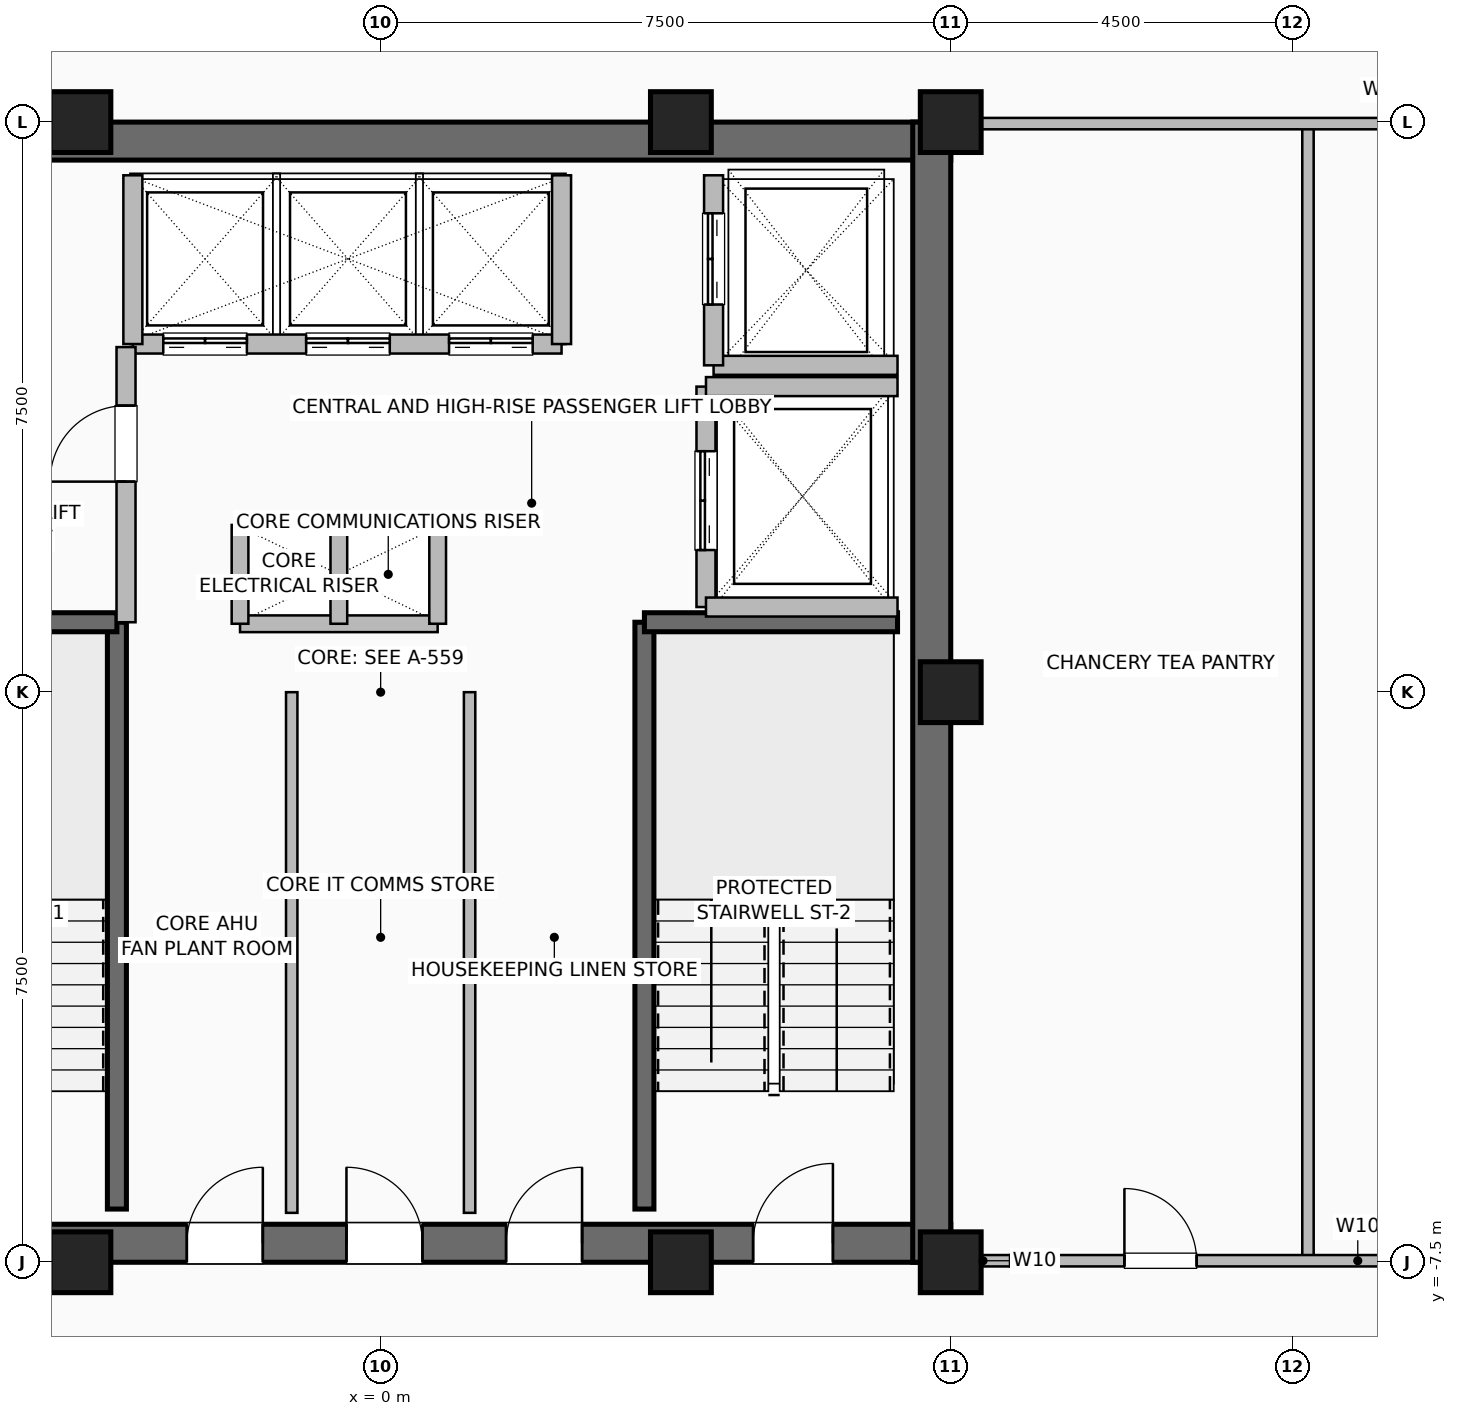
"""IFC4 building model, lengths in metres.
Left out: names, types, materials, properties, quantities, classifications, styles, units other than length and angle.
Written with IfcOpenShell. Run it as: python <this file> out.ifc"""

import sys

from ifc_helpers import new_model, si_unit, direction, frame, frame_2d, origin, origin_2d, place, context, subcontext, project, spatial, rectangle, hollow_rectangle, extrude, element, fill, save


model = new_model("IFC4")
c1 = context("Model", 3, precision=1e-05, world=origin(), true_north=direction((0.0, 1.0)))
c2 = subcontext(c1, "Body", "Model", "MODEL_VIEW")
j1 = project(units=[si_unit("LENGTHUNIT", "METRE"), si_unit("PLANEANGLEUNIT", "RADIAN")], contexts=[c1])
p1 = place(None, origin())
s1 = spatial("IfcSite", under=j1, at=p1, CompositionType="ELEMENT")
p2 = place(p1, origin())
s2 = spatial("IfcBuilding", under=s1, at=p2, CompositionType="ELEMENT")
p3 = place(p2, frame((0.0, 0.0, 236.0)))
s3 = spatial("IfcBuildingStorey", under=s2, at=p3, CompositionType="ELEMENT", Elevation=236.0)
for number, where, z_axis, x_axis in (
    (1, (-3.95, -7.5, 0.0), (0.0, 0.0, 1.0), (1.0, 0.0, 0.0)),
    (2, (3.95, -7.5, 0.0), (0.0, 0.0, 1.0), (1.0, 0.0, 0.0)),
    (3, (7.5, -7.5, 0.0), (0.0, 0.0, 1.0), (1.0, 0.0, 0.0)),
    (4, (7.5, 0.0, 0.0), (0.0, 0.0, 1.0), (1.0, 0.0, 0.0)),
    (5, (7.5, 7.5, 0.0), (0.0, 0.0, 1.0), (1.0, 0.0, 0.0)),
    (6, (3.95, 7.5, 0.0), (0.0, 0.0, 1.0), (1.0, 0.0, 0.0)),
    (7, (-3.95, 7.5, 0.0), (0.0, 0.0, 1.0), (1.0, 0.0, 0.0)),
):
    element("IfcColumn", number, at=place(p3, frame(where, z_axis=z_axis, x_axis=x_axis)), inside=s3, PredefinedType="COLUMN", context=c2, shape_type="SweptSolid", body=[
        extrude(hollow_rectangle(XDim=0.8, YDim=0.8, WallThickness=0.04, at=origin_2d()), origin(), (0.0, 0.0, 1.0), 3.6),
    ])
p4 = place(p3, frame((-7.5, -7.25, 0.0), z_axis=(0.0, 0.0, 1.0), x_axis=(1.0, 0.0, 0.0)))
e8 = element("IfcWall", 8, at=p4, inside=s3, PredefinedType="SHEAR", context=c2, shape_type="SweptSolid", body=[
    extrude(rectangle(XDim=15.0, YDim=0.5, at=frame_2d((7.5, 0.0))), origin(), (0.0, 0.0, 1.0), 3.36),
])
p5 = place(p4, frame((1.55, 0.0, 0.0)))
e9 = element("IfcOpeningElement", 9, at=p5, cuts=e8, PredefinedType="OPENING", context=c2, shape_type="SweptSolid", body=[
    extrude(rectangle(XDim=1.05, YDim=2.08, at=frame_2d((0.525, 1.04))), frame((0.0, 0.26, 0.0), z_axis=(0.0, -1.0, 0.0), x_axis=(1.0, 0.0, 0.0)), (0.0, 0.0, 1.0), 0.52),
])
p6 = place(p4, frame((12.4, 0.0, 0.0)))
e10 = element("IfcOpeningElement", 10, at=p6, cuts=e8, PredefinedType="OPENING", context=c2, shape_type="SweptSolid", body=[
    extrude(rectangle(XDim=1.05, YDim=2.08, at=frame_2d((0.525, 1.04))), frame((0.0, 0.26, 0.0), z_axis=(0.0, -1.0, 0.0), x_axis=(1.0, 0.0, 0.0)), (0.0, 0.0, 1.0), 0.52),
])
p7 = place(p4, frame((4.95, 0.0, 0.0)))
e11 = element("IfcOpeningElement", 11, at=p7, cuts=e8, PredefinedType="OPENING", context=c2, shape_type="SweptSolid", body=[
    extrude(rectangle(XDim=1.0, YDim=2.08, at=frame_2d((0.5, 1.04))), frame((0.0, 0.26, 0.0), z_axis=(0.0, -1.0, 0.0), x_axis=(1.0, 0.0, 0.0)), (0.0, 0.0, 1.0), 0.52),
])
p8 = place(p4, frame((7.05, 0.0, 0.0)))
e12 = element("IfcOpeningElement", 12, at=p8, cuts=e8, PredefinedType="OPENING", context=c2, shape_type="SweptSolid", body=[
    extrude(rectangle(XDim=1.0, YDim=2.08, at=frame_2d((0.5, 1.04))), frame((0.0, 0.26, 0.0), z_axis=(0.0, -1.0, 0.0), x_axis=(1.0, 0.0, 0.0)), (0.0, 0.0, 1.0), 0.52),
])
p9 = place(p4, frame((9.15, 0.0, 0.0)))
e13 = element("IfcOpeningElement", 13, at=p9, cuts=e8, PredefinedType="OPENING", context=c2, shape_type="SweptSolid", body=[
    extrude(rectangle(XDim=1.0, YDim=2.08, at=frame_2d((0.5, 1.04))), frame((0.0, 0.26, 0.0), z_axis=(0.0, -1.0, 0.0), x_axis=(1.0, 0.0, 0.0)), (0.0, 0.0, 1.0), 0.52),
])
for number, where, z_axis, x_axis in (
    (14, (-7.5, 7.25, 0.0), (0.0, 0.0, 1.0), (1.0, 0.0, 0.0)),
    (15, (7.25, -7.5, 0.0), (0.0, 0.0, 1.0), (0.0, 1.0, 0.0)),
):
    element("IfcWall", number, at=place(p3, frame(where, z_axis=z_axis, x_axis=x_axis)), inside=s3, PredefinedType="SHEAR", context=c2, shape_type="SweptSolid", body=[
        extrude(rectangle(XDim=15.0, YDim=0.5, at=frame_2d((7.5, 0.0))), origin(), (0.0, 0.0, 1.0), 3.36),
    ])
p10 = place(p3, frame((-3.47, -6.8, 0.0), z_axis=(0.0, 0.0, 1.0), x_axis=(0.0, 1.0, 0.0)))
e16 = element("IfcWall", 16, at=p10, inside=s3, PredefinedType="SHEAR", context=c2, shape_type="SweptSolid", body=[
    extrude(rectangle(XDim=7.72, YDim=0.25, at=frame_2d((3.86, 0.0))), origin(), (0.0, 0.0, 1.0), 3.36),
])
p11 = place(p3, frame((-6.8, 0.92, 0.0), z_axis=(0.0, 0.0, 1.0), x_axis=(1.0, 0.0, 0.0)))
e17 = element("IfcWall", 17, at=p11, inside=s3, PredefinedType="SHEAR", context=c2, shape_type="SweptSolid", body=[
    extrude(rectangle(XDim=3.33, YDim=0.25, at=frame_2d((1.665, 0.0))), origin(), (0.0, 0.0, 1.0), 3.36),
])
p12 = place(p3, frame((3.47, -6.8, 0.0), z_axis=(0.0, 0.0, 1.0), x_axis=(0.0, 1.0, 0.0)))
e18 = element("IfcWall", 18, at=p12, inside=s3, PredefinedType="SHEAR", context=c2, shape_type="SweptSolid", body=[
    extrude(rectangle(XDim=7.72, YDim=0.25, at=frame_2d((3.86, 0.0))), origin(), (0.0, 0.0, 1.0), 3.36),
])
p13 = place(p3, frame((3.47, 0.92, 0.0), z_axis=(0.0, 0.0, 1.0), x_axis=(1.0, 0.0, 0.0)))
e19 = element("IfcWall", 19, at=p13, inside=s3, PredefinedType="SHEAR", context=c2, shape_type="SweptSolid", body=[
    extrude(rectangle(XDim=3.33, YDim=0.25, at=frame_2d((1.665, 0.0))), origin(), (0.0, 0.0, 1.0), 3.36),
])
for number, where, z_axis, x_axis in (
    (20, (-1.85, 2.2, 0.0), (0.0, 0.0, 1.0), (1.0, 0.0, 0.0)),
    (21, (-1.85, 0.9, 0.0), (0.0, 0.0, 1.0), (1.0, 0.0, 0.0)),
):
    element("IfcWall", number, at=place(p3, frame(where, z_axis=z_axis, x_axis=x_axis)), inside=s3, PredefinedType="PARTITIONING", context=c2, shape_type="SweptSolid", body=[
        extrude(rectangle(XDim=2.6, YDim=0.22, at=frame_2d((1.3, 0.0))), origin(), (0.0, 0.0, 1.0), 3.36),
    ])
for number, where, z_axis, x_axis in (
    (22, (-0.55, 0.9, 0.0), (0.0, 0.0, 1.0), (0.0, 1.0, 0.0)),
    (23, (0.75, 0.9, 0.0), (0.0, 0.0, 1.0), (0.0, 1.0, 0.0)),
    (24, (-1.85, 0.9, 0.0), (0.0, 0.0, 1.0), (0.0, 1.0, 0.0)),
):
    element("IfcWall", number, at=place(p3, frame(where, z_axis=z_axis, x_axis=x_axis)), inside=s3, PredefinedType="PARTITIONING", context=c2, shape_type="SweptSolid", body=[
        extrude(rectangle(XDim=1.3, YDim=0.22, at=frame_2d((0.65, 0.0))), origin(), (0.0, 0.0, 1.0), 3.36),
    ])
p14 = place(p3, frame((-3.26, 4.58, 0.0), z_axis=(0.0, 0.0, 1.0), x_axis=(1.0, 0.0, 0.0)))
e25 = element("IfcWall", 25, at=p14, inside=s3, PredefinedType="SHEAR", context=c2, shape_type="SweptSolid", body=[
    extrude(rectangle(XDim=5.64, YDim=0.25, at=frame_2d((2.82, 0.0))), origin(), (0.0, 0.0, 1.0), 3.36),
])
p15 = place(p14, frame((0.4, 0.0, 0.0)))
e26 = element("IfcOpeningElement", 26, at=p15, cuts=e25, PredefinedType="OPENING", context=c2, shape_type="SweptSolid", body=[
    extrude(rectangle(XDim=1.1, YDim=2.2, at=frame_2d((0.55, 1.1))), frame((0.0, 0.135, 0.0), z_axis=(0.0, -1.0, 0.0), x_axis=(1.0, 0.0, 0.0)), (0.0, 0.0, 1.0), 0.27),
])
p16 = place(p14, frame((2.28, 0.0, 0.0)))
e27 = element("IfcOpeningElement", 27, at=p16, cuts=e25, PredefinedType="OPENING", context=c2, shape_type="SweptSolid", body=[
    extrude(rectangle(XDim=1.1, YDim=2.2, at=frame_2d((0.55, 1.1))), frame((0.0, 0.135, 0.0), z_axis=(0.0, -1.0, 0.0), x_axis=(1.0, 0.0, 0.0)), (0.0, 0.0, 1.0), 0.27),
])
p17 = place(p14, frame((4.16, 0.0, 0.0)))
e28 = element("IfcOpeningElement", 28, at=p17, cuts=e25, PredefinedType="OPENING", context=c2, shape_type="SweptSolid", body=[
    extrude(rectangle(XDim=1.1, YDim=2.2, at=frame_2d((0.55, 1.1))), frame((0.0, 0.135, 0.0), z_axis=(0.0, -1.0, 0.0), x_axis=(1.0, 0.0, 0.0)), (0.0, 0.0, 1.0), 0.27),
])
for number, where, z_axis, x_axis in (
    (29, (-3.26, 4.58, 0.0), (0.0, 0.0, 1.0), (0.0, 1.0, 0.0)),
    (30, (2.38, 4.58, 0.0), (0.0, 0.0, 1.0), (0.0, 1.0, 0.0)),
):
    element("IfcWall", number, at=place(p3, frame(where, z_axis=z_axis, x_axis=x_axis)), inside=s3, PredefinedType="SHEAR", context=c2, shape_type="SweptSolid", body=[
        extrude(rectangle(XDim=2.22, YDim=0.25, at=frame_2d((1.11, 0.0))), origin(), (0.0, 0.0, 1.0), 3.36),
    ])
p18 = place(p3, frame((4.38, 4.3, 0.0), z_axis=(0.0, 0.0, 1.0), x_axis=(1.0, 0.0, 0.0)))
e31 = element("IfcWall", 31, at=p18, inside=s3, PredefinedType="SHEAR", context=c2, shape_type="SweptSolid", body=[
    extrude(rectangle(XDim=2.42, YDim=0.25, at=frame_2d((1.21, 0.0))), origin(), (0.0, 0.0, 1.0), 3.36),
])
p19 = place(p3, frame((4.38, 4.3, 0.0), z_axis=(0.0, 0.0, 1.0), x_axis=(0.0, 1.0, 0.0)))
e32 = element("IfcWall", 32, at=p19, inside=s3, PredefinedType="SHEAR", context=c2, shape_type="SweptSolid", body=[
    extrude(rectangle(XDim=2.5, YDim=0.25, at=frame_2d((1.25, 0.0))), origin(), (0.0, 0.0, 1.0), 3.36),
])
p20 = place(p19, frame((0.8, 0.0, 0.0)))
e33 = element("IfcOpeningElement", 33, at=p20, cuts=e32, PredefinedType="OPENING", context=c2, shape_type="SweptSolid", body=[
    extrude(rectangle(XDim=1.2, YDim=2.2, at=frame_2d((0.6, 1.1))), frame((0.0, 0.135, 0.0), z_axis=(0.0, -1.0, 0.0), x_axis=(1.0, 0.0, 0.0)), (0.0, 0.0, 1.0), 0.27),
])
p21 = place(p3, frame((4.28, 1.12, 0.0), z_axis=(0.0, 0.0, 1.0), x_axis=(0.0, 1.0, 0.0)))
e34 = element("IfcWall", 34, at=p21, inside=s3, PredefinedType="SHEAR", context=c2, shape_type="SweptSolid", body=[
    extrude(rectangle(XDim=2.9, YDim=0.25, at=frame_2d((1.45, 0.0))), origin(), (0.0, 0.0, 1.0), 3.36),
])
p22 = place(p21, frame((0.75, 0.0, 0.0)))
e35 = element("IfcOpeningElement", 35, at=p22, cuts=e34, PredefinedType="OPENING", context=c2, shape_type="SweptSolid", body=[
    extrude(rectangle(XDim=1.3, YDim=2.3, at=frame_2d((0.65, 1.15))), frame((0.0, 0.135, 0.0), z_axis=(0.0, -1.0, 0.0), x_axis=(1.0, 0.0, 0.0)), (0.0, 0.0, 1.0), 0.27),
])
for number, where, z_axis, x_axis in (
    (36, (4.28, 1.12, 0.0), (0.0, 0.0, 1.0), (1.0, 0.0, 0.0)),
    (37, (4.28, 4.02, 0.0), (0.0, 0.0, 1.0), (1.0, 0.0, 0.0)),
):
    element("IfcWall", number, at=place(p3, frame(where, z_axis=z_axis, x_axis=x_axis)), inside=s3, PredefinedType="SHEAR", context=c2, shape_type="SweptSolid", body=[
        extrude(rectangle(XDim=2.52, YDim=0.25, at=frame_2d((1.26, 0.0))), origin(), (0.0, 0.0, 1.0), 3.36),
    ])
p23 = place(p3, frame((-3.35, 0.92, 0.0), z_axis=(0.0, 0.0, 1.0), x_axis=(0.0, 1.0, 0.0)))
e38 = element("IfcWall", 38, at=p23, inside=s3, PredefinedType="SHEAR", context=c2, shape_type="SweptSolid", body=[
    extrude(rectangle(XDim=3.62, YDim=0.25, at=frame_2d((1.81, 0.0))), origin(), (0.0, 0.0, 1.0), 3.36),
])
p24 = place(p23, frame((1.85, 0.0, 0.0)))
e39 = element("IfcOpeningElement", 39, at=p24, cuts=e38, PredefinedType="OPENING", context=c2, shape_type="SweptSolid", body=[
    extrude(rectangle(XDim=1.0, YDim=2.08, at=frame_2d((0.5, 1.04))), frame((0.0, 0.135, 0.0), z_axis=(0.0, -1.0, 0.0), x_axis=(1.0, 0.0, 0.0)), (0.0, 0.0, 1.0), 0.27),
])
for number, where, z_axis, x_axis in (
    (40, (-1.17, -6.85, 0.0), (0.0, 0.0, 1.0), (0.0, 1.0, 0.0)),
    (41, (1.17, -6.85, 0.0), (0.0, 0.0, 1.0), (0.0, 1.0, 0.0)),
):
    element("IfcWall", number, at=place(p3, frame(where, z_axis=z_axis, x_axis=x_axis)), inside=s3, PredefinedType="PARTITIONING", context=c2, shape_type="SweptSolid", body=[
        extrude(rectangle(XDim=6.85, YDim=0.15, at=frame_2d((3.425, 0.0))), origin(), (0.0, 0.0, 1.0), 3.36),
    ])
p25 = place(p3, frame((7.45, -7.48, 0.0), z_axis=(0.0, 0.0, 1.0), x_axis=(1.0, 0.0, 0.0)))
e42 = element("IfcWall", 42, at=p25, inside=s3, PredefinedType="PARTITIONING", context=c2, shape_type="SweptSolid", body=[
    extrude(rectangle(XDim=0.95, YDim=0.15, at=frame_2d((0.475, 0.0))), origin(), (0.0, 0.0, 1.0), 3.36),
])
p26 = place(p3, frame((12.2, -7.48, 0.0), z_axis=(0.0, 0.0, 1.0), x_axis=(0.0, 1.0, 0.0)))
e43 = element("IfcWall", 43, at=p26, inside=s3, PredefinedType="PARTITIONING", context=c2, shape_type="SweptSolid", body=[
    extrude(rectangle(XDim=14.9, YDim=0.15, at=frame_2d((7.45, 0.0))), origin(), (0.0, 0.0, 1.0), 3.36),
])
p27 = place(p3, frame((8.28, -7.48, 0.0), z_axis=(0.0, 0.0, 1.0), x_axis=(1.0, 0.0, 0.0)))
e44 = element("IfcWall", 44, at=p27, inside=s3, PredefinedType="PARTITIONING", context=c2, shape_type="SweptSolid", body=[
    extrude(rectangle(XDim=10.54, YDim=0.15, at=frame_2d((5.27, 0.0))), origin(), (0.0, 0.0, 1.0), 3.36),
])
p28 = place(p27, frame((1.505, 0.0, 0.0)))
e45 = element("IfcOpeningElement", 45, at=p28, cuts=e44, PredefinedType="OPENING", context=c2, shape_type="SweptSolid", body=[
    extrude(rectangle(XDim=0.95, YDim=2.06, at=frame_2d((0.475, 1.03))), frame((0.0, 0.085, 0.0), z_axis=(0.0, -1.0, 0.0), x_axis=(1.0, 0.0, 0.0)), (0.0, 0.0, 1.0), 0.17),
])
p29 = place(p27, frame((6.695, 0.0, 0.0)))
e46 = element("IfcOpeningElement", 46, at=p29, cuts=e44, PredefinedType="OPENING", context=c2, shape_type="SweptSolid", body=[
    extrude(rectangle(XDim=0.95, YDim=2.06, at=frame_2d((0.475, 1.03))), frame((0.0, 0.085, 0.0), z_axis=(0.0, -1.0, 0.0), x_axis=(1.0, 0.0, 0.0)), (0.0, 0.0, 1.0), 0.17),
])
p30 = place(p3, frame((7.6, 7.48, 0.0), z_axis=(0.0, 0.0, 1.0), x_axis=(1.0, 0.0, 0.0)))
e47 = element("IfcWall", 47, at=p30, inside=s3, PredefinedType="PARTITIONING", context=c2, shape_type="SweptSolid", body=[
    extrude(rectangle(XDim=11.22, YDim=0.15, at=frame_2d((5.61, 0.0))), origin(), (0.0, 0.0, 1.0), 3.36),
])
p31 = place(p6, origin())
e48 = element("IfcDoor", 48, at=p31, inside=s3, OperationType="SINGLE_SWING_RIGHT", PredefinedType="DOOR", context=c2, shape_type="SweptSolid", body=[
    extrude(rectangle(XDim=1.05, YDim=2.08, at=frame_2d((0.525, 1.04))), frame((0.0, 0.025, 0.0), z_axis=(0.0, -1.0, 0.0), x_axis=(1.0, 0.0, 0.0)), (0.0, 0.0, 1.0), 0.05),
])
fill(e10, e48)
p32 = place(p7, origin())
e49 = element("IfcDoor", 49, at=p32, inside=s3, OperationType="SINGLE_SWING_RIGHT", PredefinedType="DOOR", context=c2, shape_type="SweptSolid", body=[
    extrude(rectangle(XDim=1.0, YDim=2.08, at=frame_2d((0.5, 1.04))), frame((0.0, 0.025, 0.0), z_axis=(0.0, -1.0, 0.0), x_axis=(1.0, 0.0, 0.0)), (0.0, 0.0, 1.0), 0.05),
])
fill(e11, e49)
p33 = place(p8, origin())
e50 = element("IfcDoor", 50, at=p33, inside=s3, OperationType="SINGLE_SWING_LEFT", PredefinedType="DOOR", context=c2, shape_type="SweptSolid", body=[
    extrude(rectangle(XDim=1.0, YDim=2.08, at=frame_2d((0.5, 1.04))), frame((0.0, 0.025, 0.0), z_axis=(0.0, -1.0, 0.0), x_axis=(1.0, 0.0, 0.0)), (0.0, 0.0, 1.0), 0.05),
])
fill(e12, e50)
p34 = place(p9, origin())
e51 = element("IfcDoor", 51, at=p34, inside=s3, OperationType="SINGLE_SWING_RIGHT", PredefinedType="DOOR", context=c2, shape_type="SweptSolid", body=[
    extrude(rectangle(XDim=1.0, YDim=2.08, at=frame_2d((0.5, 1.04))), frame((0.0, 0.025, 0.0), z_axis=(0.0, -1.0, 0.0), x_axis=(1.0, 0.0, 0.0)), (0.0, 0.0, 1.0), 0.05),
])
fill(e13, e51)
p35 = place(p15, origin())
e52 = element("IfcDoor", 52, at=p35, inside=s3, OperationType="DOUBLE_DOOR_SLIDING", PredefinedType="DOOR", context=c2, shape_type="SweptSolid", body=[
    extrude(rectangle(XDim=1.1, YDim=2.2, at=frame_2d((0.55, 1.1))), frame((0.0, 0.025, 0.0), z_axis=(0.0, -1.0, 0.0), x_axis=(1.0, 0.0, 0.0)), (0.0, 0.0, 1.0), 0.05),
])
fill(e26, e52)
p36 = place(p16, origin())
e53 = element("IfcDoor", 53, at=p36, inside=s3, OperationType="DOUBLE_DOOR_SLIDING", PredefinedType="DOOR", context=c2, shape_type="SweptSolid", body=[
    extrude(rectangle(XDim=1.1, YDim=2.2, at=frame_2d((0.55, 1.1))), frame((0.0, 0.025, 0.0), z_axis=(0.0, -1.0, 0.0), x_axis=(1.0, 0.0, 0.0)), (0.0, 0.0, 1.0), 0.05),
])
fill(e27, e53)
p37 = place(p17, origin())
e54 = element("IfcDoor", 54, at=p37, inside=s3, OperationType="DOUBLE_DOOR_SLIDING", PredefinedType="DOOR", context=c2, shape_type="SweptSolid", body=[
    extrude(rectangle(XDim=1.1, YDim=2.2, at=frame_2d((0.55, 1.1))), frame((0.0, 0.025, 0.0), z_axis=(0.0, -1.0, 0.0), x_axis=(1.0, 0.0, 0.0)), (0.0, 0.0, 1.0), 0.05),
])
fill(e28, e54)
p38 = place(p20, origin())
e55 = element("IfcDoor", 55, at=p38, inside=s3, OperationType="DOUBLE_DOOR_SLIDING", PredefinedType="DOOR", context=c2, shape_type="SweptSolid", body=[
    extrude(rectangle(XDim=1.2, YDim=2.2, at=frame_2d((0.6, 1.1))), frame((0.0, 0.025, 0.0), z_axis=(0.0, -1.0, 0.0), x_axis=(1.0, 0.0, 0.0)), (0.0, 0.0, 1.0), 0.05),
])
fill(e33, e55)
p39 = place(p22, origin())
e56 = element("IfcDoor", 56, at=p39, inside=s3, OperationType="DOUBLE_DOOR_SLIDING", PredefinedType="DOOR", context=c2, shape_type="SweptSolid", body=[
    extrude(rectangle(XDim=1.3, YDim=2.3, at=frame_2d((0.65, 1.15))), frame((0.0, 0.025, 0.0), z_axis=(0.0, -1.0, 0.0), x_axis=(1.0, 0.0, 0.0)), (0.0, 0.0, 1.0), 0.05),
])
fill(e35, e56)
p40 = place(p24, origin())
e57 = element("IfcDoor", 57, at=p40, inside=s3, OperationType="SINGLE_SWING_LEFT", PredefinedType="DOOR", context=c2, shape_type="SweptSolid", body=[
    extrude(rectangle(XDim=1.0, YDim=2.08, at=frame_2d((0.5, 1.04))), frame((0.0, 0.025, 0.0), z_axis=(0.0, -1.0, 0.0), x_axis=(1.0, 0.0, 0.0)), (0.0, 0.0, 1.0), 0.05),
])
fill(e39, e57)
p41 = place(p28, origin())
e58 = element("IfcDoor", 58, at=p41, inside=s3, OperationType="SINGLE_SWING_LEFT", PredefinedType="DOOR", context=c2, shape_type="SweptSolid", body=[
    extrude(rectangle(XDim=0.95, YDim=2.06, at=frame_2d((0.475, 1.03))), frame((0.0, 0.025, 0.0), z_axis=(0.0, -1.0, 0.0), x_axis=(1.0, 0.0, 0.0)), (0.0, 0.0, 1.0), 0.05),
])
fill(e45, e58)
save(model, sys.argv[1])
